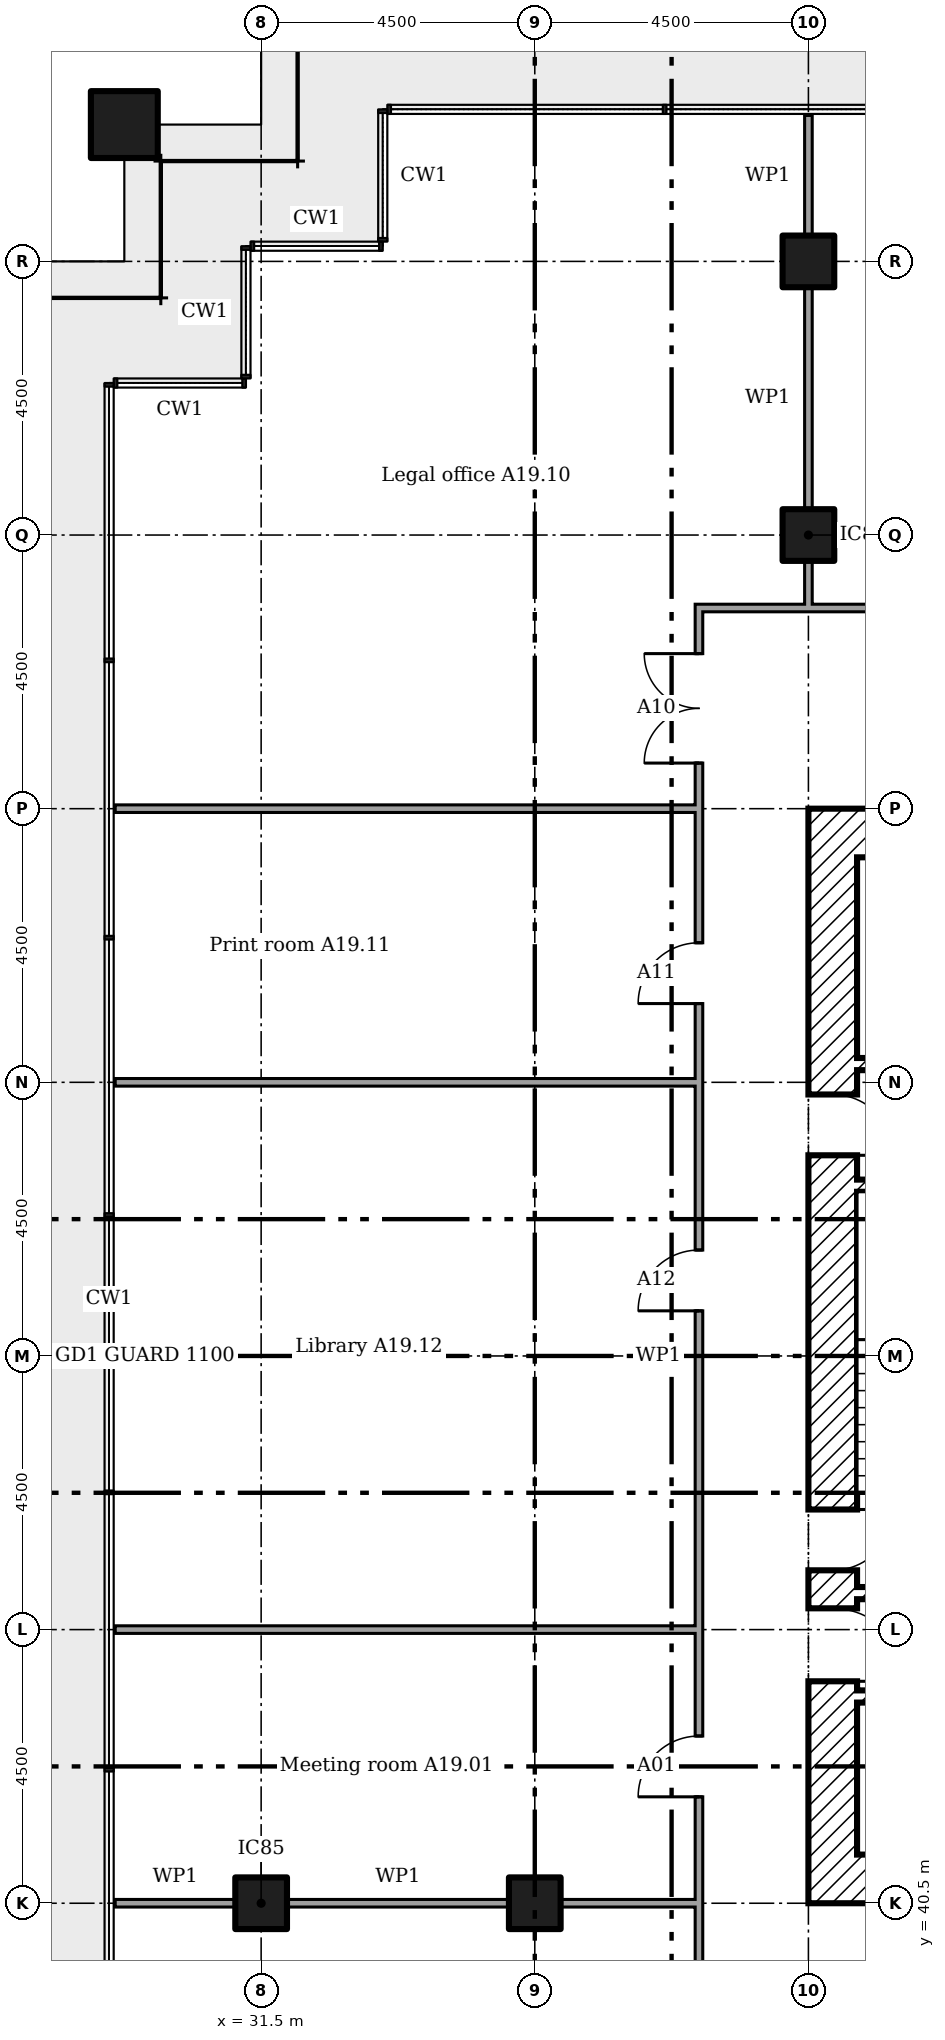
"""IFC4 building model, lengths in metres.
Left out: names, types, materials, properties, quantities, classifications, styles, units other than length and angle.
Written with IfcOpenShell. Run it as: python <this file> out.ifc"""

import sys

from ifc_helpers import new_model, si_unit, direction, frame, frame_2d, origin, origin_2d, place, context, subcontext, project, spatial, rectangle, extrude, element, fill, save


model = new_model("IFC4")
c1 = context("Model", 3, precision=1e-05, world=origin(), true_north=direction((0.0, 1.0)))
c2 = subcontext(c1, "Body", "Model", "MODEL_VIEW")
j1 = project(units=[si_unit("LENGTHUNIT", "METRE"), si_unit("PLANEANGLEUNIT", "RADIAN")], contexts=[c1])
p1 = place(None, origin())
s1 = spatial("IfcSite", under=j1, at=p1, CompositionType="ELEMENT")
p2 = place(p1, origin())
s2 = spatial("IfcBuilding", under=s1, at=p2, CompositionType="ELEMENT")
p3 = place(p2, frame((0.0, 0.0, 79.8)))
s3 = spatial("IfcBuildingStorey", under=s2, at=p3, CompositionType="ELEMENT", Elevation=79.8)
p4 = place(p3, frame((29.25, 69.75, 0.0)))
e1 = element("IfcColumn", 1, at=p4, inside=s3, PredefinedType="COLUMN", context=c2, shape_type="SweptSolid", body=[
    extrude(rectangle(XDim=1.1, YDim=1.1, at=origin_2d()), origin(), (0.0, 0.0, 1.0), 3.6),
])
for number, where in (
    (2, (31.5, 40.5, 0.0)),
    (3, (36.0, 40.5, 0.0)),
    (4, (40.5, 63.0, 0.0)),
    (5, (40.5, 67.5, 0.0)),
):
    element("IfcColumn", number, at=place(p3, frame(where)), inside=s3, PredefinedType="COLUMN", context=c2, shape_type="SweptSolid", body=[
        extrude(rectangle(XDim=0.85, YDim=0.85, at=origin_2d()), origin(), (0.0, 0.0, 1.0), 3.6),
    ])
for number, where in (
    (6, (41.3, 58.1, 0.0)),
    (7, (41.3, 40.9, 0.0)),
):
    element("IfcWall", number, at=place(p3, frame(where)), inside=s3, PredefinedType="SHEAR", context=c2, shape_type="SweptSolid", body=[
        extrude(rectangle(XDim=16.4, YDim=0.8, at=frame_2d((8.2, 0.0))), origin(), (0.0, 0.0, 1.0), 3.35),
    ])
p5 = place(p3, frame((40.9, 40.5, 0.0), z_axis=(0.0, 0.0, 1.0), x_axis=(0.0, 1.0, 0.0)))
e8 = element("IfcWall", 8, at=p5, inside=s3, PredefinedType="SHEAR", context=c2, shape_type="SweptSolid", body=[
    extrude(rectangle(XDim=18.0, YDim=0.8, at=frame_2d((9.0, 0.0))), origin(), (0.0, 0.0, 1.0), 3.35),
])
p6 = place(p5, frame((3.65, 0.0, 0.0)))
e9 = element("IfcOpeningElement", 9, at=p6, cuts=e8, PredefinedType="OPENING", context=c2, shape_type="SweptSolid", body=[
    extrude(rectangle(XDim=1.2, YDim=2.1, at=frame_2d((0.6, 1.05))), frame((0.0, 0.41, 0.0), z_axis=(0.0, -1.0, 0.0), x_axis=(1.0, 0.0, 0.0)), (0.0, 0.0, 1.0), 0.82),
])
p7 = place(p5, frame((5.475, 0.0, 0.0)))
e10 = element("IfcOpeningElement", 10, at=p7, cuts=e8, PredefinedType="OPENING", context=c2, shape_type="SweptSolid", body=[
    extrude(rectangle(XDim=1.0, YDim=2.1, at=frame_2d((0.5, 1.05))), frame((0.0, 0.41, 0.0), z_axis=(0.0, -1.0, 0.0), x_axis=(1.0, 0.0, 0.0)), (0.0, 0.0, 1.0), 0.82),
])
p8 = place(p5, frame((12.3, 0.0, 0.0)))
e11 = element("IfcOpeningElement", 11, at=p8, cuts=e8, PredefinedType="OPENING", context=c2, shape_type="SweptSolid", body=[
    extrude(rectangle(XDim=1.0, YDim=2.1, at=frame_2d((0.5, 1.05))), frame((0.0, 0.41, 0.0), z_axis=(0.0, -1.0, 0.0), x_axis=(1.0, 0.0, 0.0)), (0.0, 0.0, 1.0), 0.82),
])
p9 = place(p3, frame((41.3, 54.3, 0.0)))
e12 = element("IfcWall", 12, at=p9, inside=s3, PredefinedType="SHEAR", context=c2, shape_type="SweptSolid", body=[
    extrude(rectangle(XDim=5.433, YDim=0.2, at=frame_2d((2.717, 0.0))), origin(), (0.0, 0.0, 1.0), 3.35),
])
p10 = place(p9, frame((0.983, 0.0, 0.0)))
e13 = element("IfcOpeningElement", 13, at=p10, cuts=e12, PredefinedType="OPENING", context=c2, shape_type="SweptSolid", body=[
    extrude(rectangle(XDim=1.1, YDim=2.1, at=frame_2d((0.55, 1.05))), frame((0.0, 0.11, 0.0), z_axis=(0.0, -1.0, 0.0), x_axis=(1.0, 0.0, 0.0)), (0.0, 0.0, 1.0), 0.22),
])
p11 = place(p9, frame((3.65, 0.0, 0.0)))
e14 = element("IfcOpeningElement", 14, at=p11, cuts=e12, PredefinedType="OPENING", context=c2, shape_type="SweptSolid", body=[
    extrude(rectangle(XDim=1.1, YDim=2.1, at=frame_2d((0.55, 1.05))), frame((0.0, 0.11, 0.0), z_axis=(0.0, -1.0, 0.0), x_axis=(1.0, 0.0, 0.0)), (0.0, 0.0, 1.0), 0.22),
])
p12 = place(p3, frame((41.3, 43.9, 0.0)))
e15 = element("IfcWall", 15, at=p12, inside=s3, PredefinedType="SHEAR", context=c2, shape_type="SweptSolid", body=[
    extrude(rectangle(XDim=16.4, YDim=0.2, at=frame_2d((8.2, 0.0))), origin(), (0.0, 0.0, 1.0), 3.35),
])
p13 = place(p12, frame((0.933, 0.0, 0.0)))
e16 = element("IfcOpeningElement", 16, at=p13, cuts=e15, PredefinedType="OPENING", context=c2, shape_type="SweptSolid", body=[
    extrude(rectangle(XDim=1.2, YDim=2.1, at=frame_2d((0.6, 1.05))), frame((0.0, 0.11, 0.0), z_axis=(0.0, -1.0, 0.0), x_axis=(1.0, 0.0, 0.0)), (0.0, 0.0, 1.0), 0.22),
])
p14 = place(p12, frame((3.6, 0.0, 0.0)))
e17 = element("IfcOpeningElement", 17, at=p14, cuts=e15, PredefinedType="OPENING", context=c2, shape_type="SweptSolid", body=[
    extrude(rectangle(XDim=1.2, YDim=2.1, at=frame_2d((0.6, 1.05))), frame((0.0, 0.11, 0.0), z_axis=(0.0, -1.0, 0.0), x_axis=(1.0, 0.0, 0.0)), (0.0, 0.0, 1.0), 0.22),
])
p15 = place(p12, frame((6.267, 0.0, 0.0)))
e18 = element("IfcOpeningElement", 18, at=p15, cuts=e15, PredefinedType="OPENING", context=c2, shape_type="SweptSolid", body=[
    extrude(rectangle(XDim=1.2, YDim=2.1, at=frame_2d((0.6, 1.05))), frame((0.0, 0.11, 0.0), z_axis=(0.0, -1.0, 0.0), x_axis=(1.0, 0.0, 0.0)), (0.0, 0.0, 1.0), 0.22),
])
p16 = place(p12, frame((8.933, 0.0, 0.0)))
e19 = element("IfcOpeningElement", 19, at=p16, cuts=e15, PredefinedType="OPENING", context=c2, shape_type="SweptSolid", body=[
    extrude(rectangle(XDim=1.2, YDim=2.1, at=frame_2d((0.6, 1.05))), frame((0.0, 0.11, 0.0), z_axis=(0.0, -1.0, 0.0), x_axis=(1.0, 0.0, 0.0)), (0.0, 0.0, 1.0), 0.22),
])
p17 = place(p3, frame((41.3, 52.3, 0.0)))
e20 = element("IfcWall", 20, at=p17, inside=s3, PredefinedType="SHEAR", context=c2, shape_type="SweptSolid", body=[
    extrude(rectangle(XDim=2.7, YDim=0.2, at=frame_2d((1.35, 0.0))), origin(), (0.0, 0.0, 1.0), 3.35),
])
p18 = place(p3, frame((41.3, 45.6, 0.0)))
e21 = element("IfcWall", 21, at=p18, inside=s3, PredefinedType="SHEAR", context=c2, shape_type="SweptSolid", body=[
    extrude(rectangle(XDim=2.7, YDim=0.2, at=frame_2d((1.35, 0.0))), origin(), (0.0, 0.0, 1.0), 3.35),
])
p19 = place(p18, frame((0.95, 0.0, 0.0)))
e22 = element("IfcOpeningElement", 22, at=p19, cuts=e21, PredefinedType="OPENING", context=c2, shape_type="SweptSolid", body=[
    extrude(rectangle(XDim=1.0, YDim=2.1, at=frame_2d((0.5, 1.05))), frame((0.0, 0.11, 0.0), z_axis=(0.0, -1.0, 0.0), x_axis=(1.0, 0.0, 0.0)), (0.0, 0.0, 1.0), 0.22),
])
p20 = place(p3, frame((29.1, 40.5, 0.0)))
e23 = element("IfcWall", 23, at=p20, inside=s3, PredefinedType="PARTITIONING", context=c2, shape_type="SweptSolid", body=[
    extrude(rectangle(XDim=1.975, YDim=0.125, at=frame_2d((0.987, 0.0))), origin(), (0.0, 0.0, 1.0), 2.676),
])
p21 = place(p3, frame((31.925, 40.5, 0.0)))
e24 = element("IfcWall", 24, at=p21, inside=s3, PredefinedType="PARTITIONING", context=c2, shape_type="SweptSolid", body=[
    extrude(rectangle(XDim=3.65, YDim=0.125, at=frame_2d((1.825, 0.0))), origin(), (0.0, 0.0, 1.0), 2.676),
])
p22 = place(p3, frame((36.425, 40.5, 0.0)))
e25 = element("IfcWall", 25, at=p22, inside=s3, PredefinedType="PARTITIONING", context=c2, shape_type="SweptSolid", body=[
    extrude(rectangle(XDim=2.275, YDim=0.125, at=frame_2d((1.137, 0.0))), origin(), (0.0, 0.0, 1.0), 2.676),
])
for number, where in (
    (26, (29.1, 45.0, 0.0)),
    (27, (29.1, 54.0, 0.0)),
    (28, (29.1, 58.5, 0.0)),
):
    element("IfcWall", number, at=place(p3, frame(where)), inside=s3, PredefinedType="PARTITIONING", context=c2, shape_type="SweptSolid", body=[
        extrude(rectangle(XDim=9.6, YDim=0.125, at=frame_2d((4.8, 0.0))), origin(), (0.0, 0.0, 1.0), 2.766),
    ])
p23 = place(p3, frame((38.637, 61.8, 0.0)))
e29 = element("IfcWall", 29, at=p23, inside=s3, PredefinedType="PARTITIONING", context=c2, shape_type="SweptSolid", body=[
    extrude(rectangle(XDim=23.225, YDim=0.125, at=frame_2d((11.613, 0.0))), origin(), (0.0, 0.0, 1.0), 3.45),
])
p24 = place(p23, frame((14.433, 0.0, 0.0)))
e30 = element("IfcOpeningElement", 30, at=p24, cuts=e29, PredefinedType="OPENING", context=c2, shape_type="SweptSolid", body=[
    extrude(rectangle(XDim=1.8, YDim=2.1, at=frame_2d((0.9, 1.05))), frame((0.0, 0.073, 0.0), z_axis=(0.0, -1.0, 0.0), x_axis=(1.0, 0.0, 0.0)), (0.0, 0.0, 1.0), 0.145),
])
p25 = place(p23, frame((7.104, 0.0, 0.0)))
e31 = element("IfcOpeningElement", 31, at=p25, cuts=e29, PredefinedType="OPENING", context=c2, shape_type="SweptSolid", body=[
    extrude(rectangle(XDim=1.0, YDim=2.1, at=frame_2d((0.5, 1.05))), frame((0.0, 0.073, 0.0), z_axis=(0.0, -1.0, 0.0), x_axis=(1.0, 0.0, 0.0)), (0.0, 0.0, 1.0), 0.145),
])
p26 = place(p3, frame((38.7, 37.262, 0.0), z_axis=(0.0, 0.0, 1.0), x_axis=(0.0, 1.0, 0.0)))
e32 = element("IfcWall", 32, at=p26, inside=s3, PredefinedType="PARTITIONING", context=c2, shape_type="SweptSolid", body=[
    extrude(rectangle(XDim=24.475, YDim=0.125, at=frame_2d((12.238, 0.0))), origin(), (0.0, 0.0, 1.0), 3.45),
])
p27 = place(p26, frame((4.988, 0.0, 0.0)))
e33 = element("IfcOpeningElement", 33, at=p27, cuts=e32, PredefinedType="OPENING", context=c2, shape_type="SweptSolid", body=[
    extrude(rectangle(XDim=1.0, YDim=2.1, at=frame_2d((0.5, 1.05))), frame((0.0, 0.073, 0.0), z_axis=(0.0, -1.0, 0.0), x_axis=(1.0, 0.0, 0.0)), (0.0, 0.0, 1.0), 0.145),
])
p28 = place(p26, frame((21.988, 0.0, 0.0)))
e34 = element("IfcOpeningElement", 34, at=p28, cuts=e32, PredefinedType="OPENING", context=c2, shape_type="SweptSolid", body=[
    extrude(rectangle(XDim=1.8, YDim=2.1, at=frame_2d((0.9, 1.05))), frame((0.0, 0.073, 0.0), z_axis=(0.0, -1.0, 0.0), x_axis=(1.0, 0.0, 0.0)), (0.0, 0.0, 1.0), 0.145),
])
p29 = place(p26, frame((18.032, 0.0, 0.0)))
e35 = element("IfcOpeningElement", 35, at=p29, cuts=e32, PredefinedType="OPENING", context=c2, shape_type="SweptSolid", body=[
    extrude(rectangle(XDim=1.0, YDim=2.1, at=frame_2d((0.5, 1.05))), frame((0.0, 0.073, 0.0), z_axis=(0.0, -1.0, 0.0), x_axis=(1.0, 0.0, 0.0)), (0.0, 0.0, 1.0), 0.145),
])
p30 = place(p26, frame((12.979, 0.0, 0.0)))
e36 = element("IfcOpeningElement", 36, at=p30, cuts=e32, PredefinedType="OPENING", context=c2, shape_type="SweptSolid", body=[
    extrude(rectangle(XDim=1.0, YDim=2.1, at=frame_2d((0.5, 1.05))), frame((0.0, 0.073, 0.0), z_axis=(0.0, -1.0, 0.0), x_axis=(1.0, 0.0, 0.0)), (0.0, 0.0, 1.0), 0.145),
])
p31 = place(p3, frame((40.5, 61.8, 0.0), z_axis=(0.0, 0.0, 1.0), x_axis=(0.0, 1.0, 0.0)))
e37 = element("IfcWall", 37, at=p31, inside=s3, PredefinedType="PARTITIONING", context=c2, shape_type="SweptSolid", body=[
    extrude(rectangle(XDim=0.775, YDim=0.125, at=frame_2d((0.387, 0.0))), origin(), (0.0, 0.0, 1.0), 2.676),
])
p32 = place(p3, frame((40.5, 63.425, 0.0), z_axis=(0.0, 0.0, 1.0), x_axis=(0.0, 1.0, 0.0)))
e38 = element("IfcWall", 38, at=p32, inside=s3, PredefinedType="PARTITIONING", context=c2, shape_type="SweptSolid", body=[
    extrude(rectangle(XDim=3.65, YDim=0.125, at=frame_2d((1.825, 0.0))), origin(), (0.0, 0.0, 1.0), 2.676),
])
p33 = place(p3, frame((40.5, 67.925, 0.0), z_axis=(0.0, 0.0, 1.0), x_axis=(0.0, 1.0, 0.0)))
e39 = element("IfcWall", 39, at=p33, inside=s3, PredefinedType="PARTITIONING", context=c2, shape_type="SweptSolid", body=[
    extrude(rectangle(XDim=1.975, YDim=0.125, at=frame_2d((0.987, 0.0))), origin(), (0.0, 0.0, 1.0), 2.676),
])
p34 = place(p6, frame((1.2, 0.0, 0.0), x_axis=(-1.0, 0.0, 0.0)))
e40 = element("IfcDoor", 40, at=p34, inside=s3, OperationType="SINGLE_SWING_LEFT", PredefinedType="DOOR", context=c2, shape_type="SweptSolid", body=[
    extrude(rectangle(XDim=1.2, YDim=2.1, at=frame_2d((0.6, 1.05))), frame((0.0, 0.025, 0.0), z_axis=(0.0, -1.0, 0.0), x_axis=(1.0, 0.0, 0.0)), (0.0, 0.0, 1.0), 0.05),
])
fill(e9, e40)
p35 = place(p7, frame((1.0, 0.0, 0.0), x_axis=(-1.0, 0.0, 0.0)))
e41 = element("IfcDoor", 41, at=p35, inside=s3, OperationType="SINGLE_SWING_RIGHT", PredefinedType="DOOR", context=c2, shape_type="SweptSolid", body=[
    extrude(rectangle(XDim=1.0, YDim=2.1, at=frame_2d((0.5, 1.05))), frame((0.0, 0.025, 0.0), z_axis=(0.0, -1.0, 0.0), x_axis=(1.0, 0.0, 0.0)), (0.0, 0.0, 1.0), 0.05),
])
fill(e10, e41)
p36 = place(p8, frame((1.0, 0.0, 0.0), x_axis=(-1.0, 0.0, 0.0)))
e42 = element("IfcDoor", 42, at=p36, inside=s3, OperationType="SINGLE_SWING_LEFT", PredefinedType="DOOR", context=c2, shape_type="SweptSolid", body=[
    extrude(rectangle(XDim=1.0, YDim=2.1, at=frame_2d((0.5, 1.05))), frame((0.0, 0.025, 0.0), z_axis=(0.0, -1.0, 0.0), x_axis=(1.0, 0.0, 0.0)), (0.0, 0.0, 1.0), 0.05),
])
fill(e11, e42)
p37 = place(p27, origin())
e43 = element("IfcDoor", 43, at=p37, inside=s3, OperationType="SINGLE_SWING_RIGHT", PredefinedType="DOOR", context=c2, shape_type="SweptSolid", body=[
    extrude(rectangle(XDim=1.0, YDim=2.1, at=frame_2d((0.5, 1.05))), frame((0.0, 0.025, 0.0), z_axis=(0.0, -1.0, 0.0), x_axis=(1.0, 0.0, 0.0)), (0.0, 0.0, 1.0), 0.05),
])
fill(e33, e43)
p38 = place(p28, origin())
e44 = element("IfcDoor", 44, at=p38, inside=s3, OperationType="DOUBLE_DOOR_SINGLE_SWING", PredefinedType="DOOR", context=c2, shape_type="SweptSolid", body=[
    extrude(rectangle(XDim=1.8, YDim=2.1, at=frame_2d((0.9, 1.05))), frame((0.0, 0.025, 0.0), z_axis=(0.0, -1.0, 0.0), x_axis=(1.0, 0.0, 0.0)), (0.0, 0.0, 1.0), 0.05),
])
fill(e34, e44)
p39 = place(p29, origin())
e45 = element("IfcDoor", 45, at=p39, inside=s3, OperationType="SINGLE_SWING_RIGHT", PredefinedType="DOOR", context=c2, shape_type="SweptSolid", body=[
    extrude(rectangle(XDim=1.0, YDim=2.1, at=frame_2d((0.5, 1.05))), frame((0.0, 0.025, 0.0), z_axis=(0.0, -1.0, 0.0), x_axis=(1.0, 0.0, 0.0)), (0.0, 0.0, 1.0), 0.05),
])
fill(e35, e45)
p40 = place(p30, origin())
e46 = element("IfcDoor", 46, at=p40, inside=s3, OperationType="SINGLE_SWING_RIGHT", PredefinedType="DOOR", context=c2, shape_type="SweptSolid", body=[
    extrude(rectangle(XDim=1.0, YDim=2.1, at=frame_2d((0.5, 1.05))), frame((0.0, 0.025, 0.0), z_axis=(0.0, -1.0, 0.0), x_axis=(1.0, 0.0, 0.0)), (0.0, 0.0, 1.0), 0.05),
])
fill(e36, e46)
save(model, sys.argv[1])
